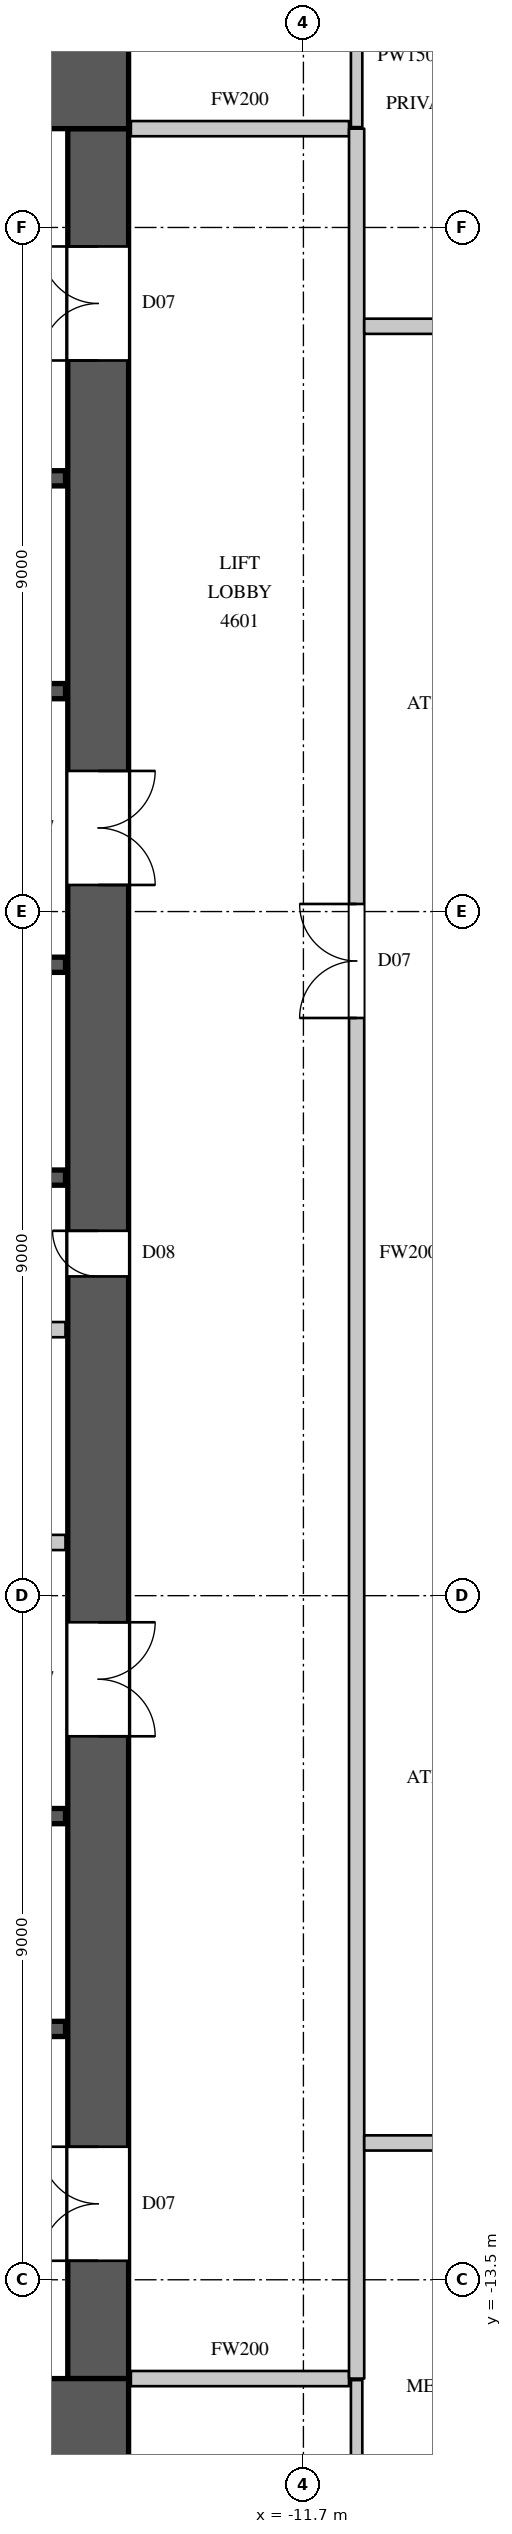
"""IFC4 building model, lengths in metres.
Left out: names, types, materials, properties, quantities, classifications, styles, units other than length and angle.
Written with IfcOpenShell. Run it as: python <this file> out.ifc"""

import sys

from ifc_helpers import new_model, si_unit, direction, frame, frame_2d, origin, place, context, subcontext, project, spatial, rectangle, extrude, element, fill, save


model = new_model("IFC4")
c1 = context("Model", 3, precision=1e-05, world=origin(), true_north=direction((0.0, 1.0)))
c2 = subcontext(c1, "Body", "Model", "MODEL_VIEW")
j1 = project(units=[si_unit("LENGTHUNIT", "METRE"), si_unit("PLANEANGLEUNIT", "RADIAN")], contexts=[c1])
p1 = place(None, origin())
s1 = spatial("IfcSite", under=j1, at=p1, CompositionType="ELEMENT")
p2 = place(p1, origin())
s2 = spatial("IfcBuilding", under=s1, at=p2, CompositionType="ELEMENT")
p3 = place(p2, frame((0.0, 0.0, 209.7)))
s3 = spatial("IfcBuildingStorey", under=s2, at=p3, CompositionType="ELEMENT", Elevation=209.7)
for number, where, z_axis, x_axis in (
    (1, (-30.0, 15.4, 0.0), (0.0, 0.0, 1.0), (1.0, 0.0, 0.0)),
    (2, (-30.0, -15.4, 0.0), (0.0, 0.0, 1.0), (1.0, 0.0, 0.0)),
):
    element("IfcWall", number, at=place(p3, frame(where, z_axis=z_axis, x_axis=x_axis)), inside=s3, PredefinedType="SHEAR", context=c2, shape_type="SweptSolid", body=[
        extrude(rectangle(XDim=16.0, YDim=1.2, at=frame_2d((8.0, 0.0))), origin(), (0.0, 0.0, 1.0), 4.1),
    ])
p4 = place(p3, frame((-14.4, -14.8, 0.0), z_axis=(0.0, 0.0, 1.0), x_axis=(0.0, 1.0, 0.0)))
e3 = element("IfcWall", 3, at=p4, inside=s3, PredefinedType="SHEAR", context=c2, shape_type="SweptSolid", body=[
    extrude(rectangle(XDim=29.6, YDim=0.8, at=frame_2d((14.8, 0.0))), origin(), (0.0, 0.0, 1.0), 4.1),
])
p5 = place(p4, frame((1.55, 0.0, 0.0)))
e4 = element("IfcOpeningElement", 4, at=p5, cuts=e3, PredefinedType="OPENING", context=c2, shape_type="SweptSolid", body=[
    extrude(rectangle(XDim=1.5, YDim=2.4, at=frame_2d((0.75, 1.2))), frame((0.0, 0.41, 0.0), z_axis=(0.0, -1.0, 0.0), x_axis=(1.0, 0.0, 0.0)), (0.0, 0.0, 1.0), 0.82),
])
p6 = place(p4, frame((26.55, 0.0, 0.0)))
e5 = element("IfcOpeningElement", 5, at=p6, cuts=e3, PredefinedType="OPENING", context=c2, shape_type="SweptSolid", body=[
    extrude(rectangle(XDim=1.5, YDim=2.4, at=frame_2d((0.75, 1.2))), frame((0.0, 0.41, 0.0), z_axis=(0.0, -1.0, 0.0), x_axis=(1.0, 0.0, 0.0)), (0.0, 0.0, 1.0), 0.82),
])
p7 = place(p4, frame((8.45, 0.0, 0.0)))
e6 = element("IfcOpeningElement", 6, at=p7, cuts=e3, PredefinedType="OPENING", context=c2, shape_type="SweptSolid", body=[
    extrude(rectangle(XDim=1.5, YDim=2.4, at=frame_2d((0.75, 1.2))), frame((0.0, 0.41, 0.0), z_axis=(0.0, -1.0, 0.0), x_axis=(1.0, 0.0, 0.0)), (0.0, 0.0, 1.0), 0.82),
])
p8 = place(p4, frame((19.65, 0.0, 0.0)))
e7 = element("IfcOpeningElement", 7, at=p8, cuts=e3, PredefinedType="OPENING", context=c2, shape_type="SweptSolid", body=[
    extrude(rectangle(XDim=1.5, YDim=2.4, at=frame_2d((0.75, 1.2))), frame((0.0, 0.41, 0.0), z_axis=(0.0, -1.0, 0.0), x_axis=(1.0, 0.0, 0.0)), (0.0, 0.0, 1.0), 0.82),
])
p9 = place(p4, frame((14.5, 0.0, 0.0)))
e8 = element("IfcOpeningElement", 8, at=p9, cuts=e3, PredefinedType="OPENING", context=c2, shape_type="SweptSolid", body=[
    extrude(rectangle(XDim=0.6, YDim=2.0, at=frame_2d((0.3, 1.0))), frame((0.0, 0.41, 0.0), z_axis=(0.0, -1.0, 0.0), x_axis=(1.0, 0.0, 0.0)), (0.0, 0.0, 1.0), 0.82),
])
p10 = place(p3, frame((-29.17, -3.8, 0.0), z_axis=(0.0, 0.0, 1.0), x_axis=(1.0, 0.0, 0.0)))
e9 = element("IfcWall", 9, at=p10, inside=s3, PredefinedType="PARTITIONING", context=c2, shape_type="SweptSolid", body=[
    extrude(rectangle(XDim=14.34, YDim=0.2, at=frame_2d((7.17, 0.0))), origin(), (0.0, 0.0, 1.0), 3.8),
])
p11 = place(p10, frame((3.6, 0.0, 0.0)))
e10 = element("IfcOpeningElement", 10, at=p11, cuts=e9, PredefinedType="OPENING", context=c2, shape_type="SweptSolid", body=[
    extrude(rectangle(XDim=0.9, YDim=2.2, at=frame_2d((0.45, 1.1))), frame((0.0, 0.11, 0.0), z_axis=(0.0, -1.0, 0.0), x_axis=(1.0, 0.0, 0.0)), (0.0, 0.0, 1.0), 0.22),
])
p12 = place(p10, frame((10.6, 0.0, 0.0)))
e11 = element("IfcOpeningElement", 11, at=p12, cuts=e9, PredefinedType="OPENING", context=c2, shape_type="SweptSolid", body=[
    extrude(rectangle(XDim=0.9, YDim=2.2, at=frame_2d((0.45, 1.1))), frame((0.0, 0.11, 0.0), z_axis=(0.0, -1.0, 0.0), x_axis=(1.0, 0.0, 0.0)), (0.0, 0.0, 1.0), 0.22),
])
for number, where, z_axis, x_axis in (
    (12, (-13.97, -14.8, 0.0), (0.0, 0.0, 1.0), (1.0, 0.0, 0.0)),
    (13, (-13.97, 14.8, 0.0), (0.0, 0.0, 1.0), (1.0, 0.0, 0.0)),
):
    element("IfcWall", number, at=place(p3, frame(where, z_axis=z_axis, x_axis=x_axis)), inside=s3, PredefinedType="PARTITIONING", context=c2, shape_type="SweptSolid", body=[
        extrude(rectangle(XDim=2.87, YDim=0.2, at=frame_2d((1.435, 0.0))), origin(), (0.0, 0.0, 1.0), 3.8),
    ])
p13 = place(p3, frame((-11.0, -14.8, 0.0), z_axis=(0.0, 0.0, 1.0), x_axis=(0.0, 1.0, 0.0)))
e14 = element("IfcWall", 14, at=p13, inside=s3, PredefinedType="PARTITIONING", context=c2, shape_type="SweptSolid", body=[
    extrude(rectangle(XDim=29.6, YDim=0.2, at=frame_2d((14.8, 0.0))), origin(), (0.0, 0.0, 1.0), 3.8),
])
p14 = place(p13, frame((17.9, 0.0, 0.0)))
e15 = element("IfcOpeningElement", 15, at=p14, cuts=e14, PredefinedType="OPENING", context=c2, shape_type="SweptSolid", body=[
    extrude(rectangle(XDim=1.5, YDim=2.4, at=frame_2d((0.75, 1.2))), frame((0.0, 0.11, 0.0), z_axis=(0.0, -1.0, 0.0), x_axis=(1.0, 0.0, 0.0)), (0.0, 0.0, 1.0), 0.22),
])
p15 = place(p3, frame((-10.9, -11.7, 0.0), z_axis=(0.0, 0.0, 1.0), x_axis=(1.0, 0.0, 0.0)))
e16 = element("IfcWall", 16, at=p15, inside=s3, PredefinedType="PARTITIONING", context=c2, shape_type="SweptSolid", body=[
    extrude(rectangle(XDim=21.5, YDim=0.2, at=frame_2d((10.75, 0.0))), origin(), (0.0, 0.0, 1.0), 3.8),
])
p16 = place(p15, frame((13.2, 0.0, 0.0)))
e17 = element("IfcOpeningElement", 17, at=p16, cuts=e16, PredefinedType="OPENING", context=c2, shape_type="SweptSolid", body=[
    extrude(rectangle(XDim=0.9, YDim=2.2, at=frame_2d((0.45, 1.1))), frame((0.0, 0.11, 0.0), z_axis=(0.0, -1.0, 0.0), x_axis=(1.0, 0.0, 0.0)), (0.0, 0.0, 1.0), 0.22),
])
p17 = place(p15, frame((16.5, 0.0, 0.0)))
e18 = element("IfcOpeningElement", 18, at=p17, cuts=e16, PredefinedType="OPENING", context=c2, shape_type="SweptSolid", body=[
    extrude(rectangle(XDim=0.9, YDim=2.2, at=frame_2d((0.45, 1.1))), frame((0.0, 0.11, 0.0), z_axis=(0.0, -1.0, 0.0), x_axis=(1.0, 0.0, 0.0)), (0.0, 0.0, 1.0), 0.22),
])
p18 = place(p15, frame((20.25, 0.0, 0.0)))
e19 = element("IfcOpeningElement", 19, at=p18, cuts=e16, PredefinedType="OPENING", context=c2, shape_type="SweptSolid", body=[
    extrude(rectangle(XDim=0.9, YDim=2.2, at=frame_2d((0.45, 1.1))), frame((0.0, 0.11, 0.0), z_axis=(0.0, -1.0, 0.0), x_axis=(1.0, 0.0, 0.0)), (0.0, 0.0, 1.0), 0.22),
])
p19 = place(p15, frame((1.25, 0.0, 0.0)))
e20 = element("IfcOpeningElement", 20, at=p19, cuts=e16, PredefinedType="OPENING", context=c2, shape_type="SweptSolid", body=[
    extrude(rectangle(XDim=1.1, YDim=2.4, at=frame_2d((0.55, 1.2))), frame((0.0, 0.11, 0.0), z_axis=(0.0, -1.0, 0.0), x_axis=(1.0, 0.0, 0.0)), (0.0, 0.0, 1.0), 0.22),
])
p20 = place(p15, frame((7.3, 0.0, 0.0)))
e21 = element("IfcOpeningElement", 21, at=p20, cuts=e16, PredefinedType="OPENING", context=c2, shape_type="SweptSolid", body=[
    extrude(rectangle(XDim=1.1, YDim=2.4, at=frame_2d((0.55, 1.2))), frame((0.0, 0.11, 0.0), z_axis=(0.0, -1.0, 0.0), x_axis=(1.0, 0.0, 0.0)), (0.0, 0.0, 1.0), 0.22),
])
p21 = place(p3, frame((-10.9, 12.2, 0.0), z_axis=(0.0, 0.0, 1.0), x_axis=(1.0, 0.0, 0.0)))
e22 = element("IfcWall", 22, at=p21, inside=s3, PredefinedType="PARTITIONING", context=c2, shape_type="SweptSolid", body=[
    extrude(rectangle(XDim=3.704, YDim=0.2, at=frame_2d((1.852, 0.0))), origin(), (0.0, 0.0, 1.0), 3.8),
])
p22 = place(p21, frame((1.7, 0.0, 0.0)))
e23 = element("IfcOpeningElement", 23, at=p22, cuts=e22, PredefinedType="OPENING", context=c2, shape_type="SweptSolid", body=[
    extrude(rectangle(XDim=1.1, YDim=2.4, at=frame_2d((0.55, 1.2))), frame((0.0, 0.11, 0.0), z_axis=(0.0, -1.0, 0.0), x_axis=(1.0, 0.0, 0.0)), (0.0, 0.0, 1.0), 0.22),
])
for number, where, z_axis, x_axis in (
    (24, (-11.0, -16.7, 0.0), (0.0, 0.0, 1.0), (0.0, 1.0, 0.0)),
    (25, (-11.0, 14.82, 0.0), (0.0, 0.0, 1.0), (0.0, 1.0, 0.0)),
):
    element("IfcWall", number, at=place(p3, frame(where, z_axis=z_axis, x_axis=x_axis)), inside=s3, PredefinedType="PARTITIONING", context=c2, shape_type="SweptSolid", body=[
        extrude(rectangle(XDim=1.88, YDim=0.15, at=frame_2d((0.94, 0.0))), origin(), (0.0, 0.0, 1.0), 3.8),
    ])
p23 = place(p3, frame((-29.17, -1.0, 0.0), z_axis=(0.0, 0.0, 1.0), x_axis=(1.0, 0.0, 0.0)))
e26 = element("IfcWall", 26, at=p23, inside=s3, PredefinedType="PARTITIONING", context=c2, shape_type="SweptSolid", body=[
    extrude(rectangle(XDim=14.34, YDim=0.2, at=frame_2d((7.17, 0.0))), origin(), (0.0, 0.0, 1.0), 3.8),
])
p24 = place(p3, frame((-26.08, 1.0, 0.0), z_axis=(0.0, 0.0, 1.0), x_axis=(1.0, 0.0, 0.0)))
e27 = element("IfcWall", 27, at=p24, inside=s3, PredefinedType="SHEAR", context=c2, shape_type="SweptSolid", body=[
    extrude(rectangle(XDim=11.25, YDim=0.2, at=frame_2d((5.625, 0.0))), origin(), (0.0, 0.0, 1.0), 3.8),
])
p25 = place(p3, frame((-26.08, 3.8, 0.0), z_axis=(0.0, 0.0, 1.0), x_axis=(1.0, 0.0, 0.0)))
e28 = element("IfcWall", 28, at=p25, inside=s3, PredefinedType="SHEAR", context=c2, shape_type="SweptSolid", body=[
    extrude(rectangle(XDim=11.25, YDim=0.2, at=frame_2d((5.625, 0.0))), origin(), (0.0, 0.0, 1.0), 3.8),
])
p26 = place(p25, frame((0.8, 0.0, 0.0)))
e29 = element("IfcOpeningElement", 29, at=p26, cuts=e28, PredefinedType="OPENING", context=c2, shape_type="SweptSolid", body=[
    extrude(rectangle(XDim=1.1, YDim=2.2, at=frame_2d((0.55, 1.1))), frame((0.0, 0.11, 0.0), z_axis=(0.0, -1.0, 0.0), x_axis=(1.0, 0.0, 0.0)), (0.0, 0.0, 1.0), 0.22),
])
p27 = place(p25, frame((3.55, 0.0, 0.0)))
e30 = element("IfcOpeningElement", 30, at=p27, cuts=e28, PredefinedType="OPENING", context=c2, shape_type="SweptSolid", body=[
    extrude(rectangle(XDim=1.1, YDim=2.2, at=frame_2d((0.55, 1.1))), frame((0.0, 0.11, 0.0), z_axis=(0.0, -1.0, 0.0), x_axis=(1.0, 0.0, 0.0)), (0.0, 0.0, 1.0), 0.22),
])
p28 = place(p25, frame((6.25, 0.0, 0.0)))
e31 = element("IfcOpeningElement", 31, at=p28, cuts=e28, PredefinedType="OPENING", context=c2, shape_type="SweptSolid", body=[
    extrude(rectangle(XDim=1.1, YDim=2.2, at=frame_2d((0.55, 1.1))), frame((0.0, 0.11, 0.0), z_axis=(0.0, -1.0, 0.0), x_axis=(1.0, 0.0, 0.0)), (0.0, 0.0, 1.0), 0.22),
])
p29 = place(p25, frame((9.15, 0.0, 0.0)))
e32 = element("IfcOpeningElement", 32, at=p29, cuts=e28, PredefinedType="OPENING", context=c2, shape_type="SweptSolid", body=[
    extrude(rectangle(XDim=1.1, YDim=2.2, at=frame_2d((0.55, 1.1))), frame((0.0, 0.11, 0.0), z_axis=(0.0, -1.0, 0.0), x_axis=(1.0, 0.0, 0.0)), (0.0, 0.0, 1.0), 0.22),
])
p30 = place(p3, frame((-17.92, -10.2, 0.0), z_axis=(0.0, 0.0, 1.0), x_axis=(1.0, 0.0, 0.0)))
e33 = element("IfcWall", 33, at=p30, inside=s3, PredefinedType="SHEAR", context=c2, shape_type="SweptSolid", body=[
    extrude(rectangle(XDim=3.09, YDim=0.2, at=frame_2d((1.545, 0.0))), origin(), (0.0, 0.0, 1.0), 3.8),
])
p31 = place(p30, frame((1.0, 0.0, 0.0)))
e34 = element("IfcOpeningElement", 34, at=p31, cuts=e33, PredefinedType="OPENING", context=c2, shape_type="SweptSolid", body=[
    extrude(rectangle(XDim=1.1, YDim=2.2, at=frame_2d((0.55, 1.1))), frame((0.0, 0.11, 0.0), z_axis=(0.0, -1.0, 0.0), x_axis=(1.0, 0.0, 0.0)), (0.0, 0.0, 1.0), 0.22),
])
p32 = place(p3, frame((-17.9, -7.4, 0.0), z_axis=(0.0, 0.0, 1.0), x_axis=(1.0, 0.0, 0.0)))
e35 = element("IfcWall", 35, at=p32, inside=s3, PredefinedType="SHEAR", context=c2, shape_type="SweptSolid", body=[
    extrude(rectangle(XDim=3.07, YDim=0.2, at=frame_2d((1.535, 0.0))), origin(), (0.0, 0.0, 1.0), 3.8),
])
p33 = place(p3, frame((-17.92, 7.4, 0.0), z_axis=(0.0, 0.0, 1.0), x_axis=(1.0, 0.0, 0.0)))
e36 = element("IfcWall", 36, at=p33, inside=s3, PredefinedType="SHEAR", context=c2, shape_type="SweptSolid", body=[
    extrude(rectangle(XDim=3.09, YDim=0.2, at=frame_2d((1.545, 0.0))), origin(), (0.0, 0.0, 1.0), 3.8),
])
p34 = place(p3, frame((-17.92, 10.2, 0.0), z_axis=(0.0, 0.0, 1.0), x_axis=(1.0, 0.0, 0.0)))
e37 = element("IfcWall", 37, at=p34, inside=s3, PredefinedType="SHEAR", context=c2, shape_type="SweptSolid", body=[
    extrude(rectangle(XDim=3.09, YDim=0.2, at=frame_2d((1.545, 0.0))), origin(), (0.0, 0.0, 1.0), 3.8),
])
p35 = place(p34, frame((1.0, 0.0, 0.0)))
e38 = element("IfcOpeningElement", 38, at=p35, cuts=e37, PredefinedType="OPENING", context=c2, shape_type="SweptSolid", body=[
    extrude(rectangle(XDim=1.1, YDim=2.2, at=frame_2d((0.55, 1.1))), frame((0.0, 0.11, 0.0), z_axis=(0.0, -1.0, 0.0), x_axis=(1.0, 0.0, 0.0)), (0.0, 0.0, 1.0), 0.22),
])
p36 = place(p14, origin())
e39 = element("IfcDoor", 39, at=p36, inside=s3, OperationType="DOUBLE_DOOR_SINGLE_SWING", PredefinedType="DOOR", context=c2, shape_type="SweptSolid", body=[
    extrude(rectangle(XDim=1.5, YDim=2.4, at=frame_2d((0.75, 1.2))), frame((0.0, 0.025, 0.0), z_axis=(0.0, -1.0, 0.0), x_axis=(1.0, 0.0, 0.0)), (0.0, 0.0, 1.0), 0.05),
])
fill(e15, e39)
p37 = place(p5, origin())
e40 = element("IfcDoor", 40, at=p37, inside=s3, OperationType="DOUBLE_DOOR_SINGLE_SWING", PredefinedType="DOOR", context=c2, shape_type="SweptSolid", body=[
    extrude(rectangle(XDim=1.5, YDim=2.4, at=frame_2d((0.75, 1.2))), frame((0.0, 0.395, 0.0), z_axis=(0.0, -1.0, 0.0), x_axis=(1.0, 0.0, 0.0)), (0.0, 0.0, 1.0), 0.05),
])
fill(e4, e40)
p38 = place(p6, origin())
e41 = element("IfcDoor", 41, at=p38, inside=s3, OperationType="DOUBLE_DOOR_SINGLE_SWING", PredefinedType="DOOR", context=c2, shape_type="SweptSolid", body=[
    extrude(rectangle(XDim=1.5, YDim=2.4, at=frame_2d((0.75, 1.2))), frame((0.0, 0.395, 0.0), z_axis=(0.0, -1.0, 0.0), x_axis=(1.0, 0.0, 0.0)), (0.0, 0.0, 1.0), 0.05),
])
fill(e5, e41)
p39 = place(p7, origin())
e42 = element("IfcDoor", 42, at=p39, inside=s3, OperationType="DOUBLE_DOOR_SINGLE_SWING", PredefinedType="DOOR", context=c2, shape_type="SweptSolid", body=[
    extrude(rectangle(XDim=1.5, YDim=2.4, at=frame_2d((0.75, 1.2))), frame((0.0, -0.345, 0.0), z_axis=(0.0, -1.0, 0.0), x_axis=(1.0, 0.0, 0.0)), (0.0, 0.0, 1.0), 0.05),
])
fill(e6, e42)
p40 = place(p8, origin())
e43 = element("IfcDoor", 43, at=p40, inside=s3, OperationType="DOUBLE_DOOR_SINGLE_SWING", PredefinedType="DOOR", context=c2, shape_type="SweptSolid", body=[
    extrude(rectangle(XDim=1.5, YDim=2.4, at=frame_2d((0.75, 1.2))), frame((0.0, -0.345, 0.0), z_axis=(0.0, -1.0, 0.0), x_axis=(1.0, 0.0, 0.0)), (0.0, 0.0, 1.0), 0.05),
])
fill(e7, e43)
p41 = place(p9, origin())
e44 = element("IfcDoor", 44, at=p41, inside=s3, OperationType="SINGLE_SWING_RIGHT", PredefinedType="DOOR", context=c2, shape_type="SweptSolid", body=[
    extrude(rectangle(XDim=0.6, YDim=2.0, at=frame_2d((0.3, 1.0))), frame((0.0, 0.395, 0.0), z_axis=(0.0, -1.0, 0.0), x_axis=(1.0, 0.0, 0.0)), (0.0, 0.0, 1.0), 0.05),
])
fill(e8, e44)
save(model, sys.argv[1])
